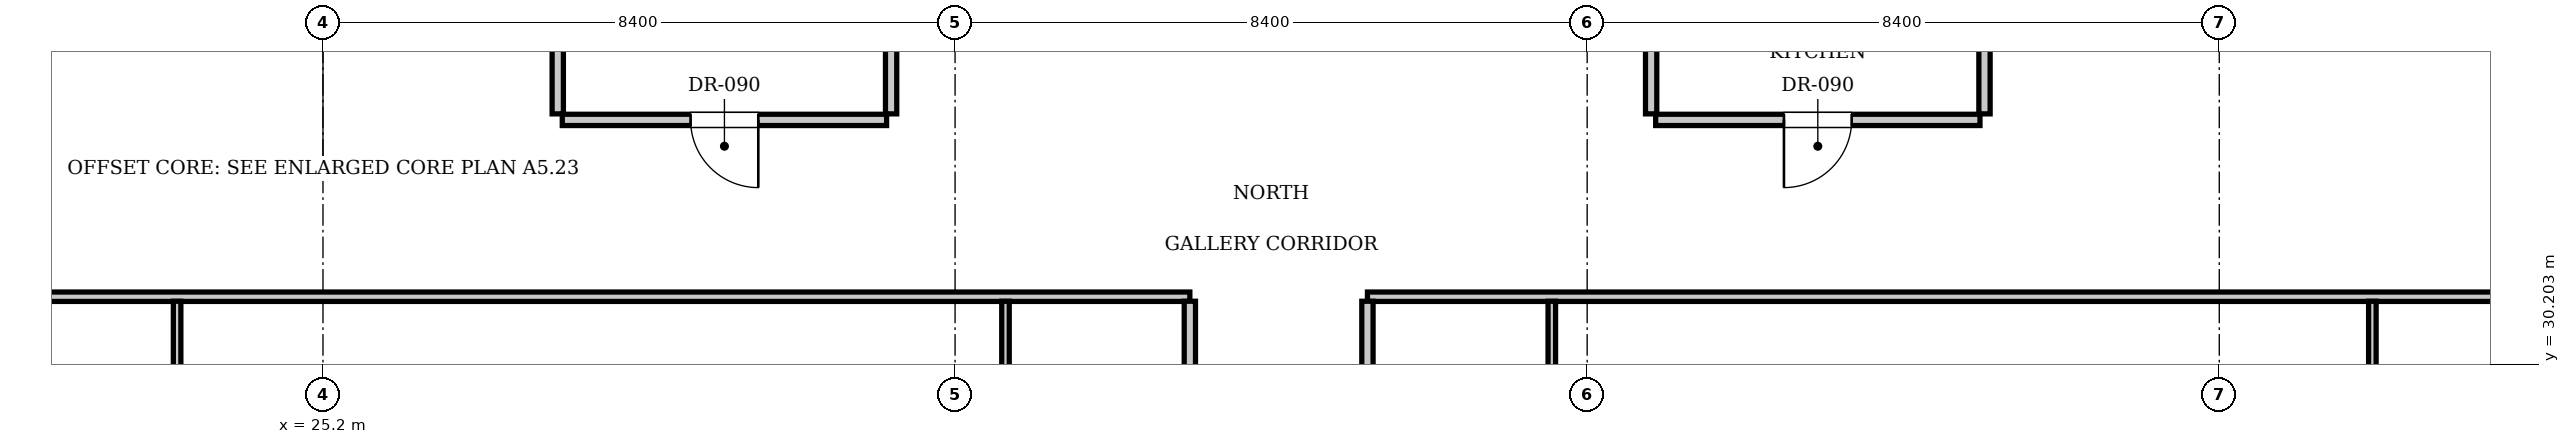
"""IFC4 building model, lengths in metres.
Left out: names, types, materials, properties, quantities, classifications, styles, units other than length and angle.
Written with IfcOpenShell. Run it as: python <this file> out.ifc"""

import sys

from ifc_helpers import new_model, si_unit, direction, frame, frame_2d, origin, place, context, subcontext, project, spatial, rectangle, extrude, element, fill, save


model = new_model("IFC4")
c1 = context("Model", 3, precision=1e-05, world=origin(), true_north=direction((0.0, 1.0)))
c2 = subcontext(c1, "Body", "Model", "MODEL_VIEW")
j1 = project(units=[si_unit("LENGTHUNIT", "METRE"), si_unit("PLANEANGLEUNIT", "RADIAN")], contexts=[c1])
p1 = place(None, origin())
s1 = spatial("IfcSite", under=j1, at=p1, CompositionType="ELEMENT")
p2 = place(p1, origin())
s2 = spatial("IfcBuilding", under=s1, at=p2, CompositionType="ELEMENT")
p3 = place(p2, frame((0.0, 0.0, 208.25)))
s3 = spatial("IfcBuildingStorey", under=s2, at=p3, CompositionType="ELEMENT", Elevation=208.25)
for number, where, z_axis, x_axis in (
    (1, (28.32, 33.53, 0.0), (0.0, 0.0, 1.0), (0.0, 1.0, 0.0)),
    (2, (32.75, 33.53, 0.0), (0.0, 0.0, 1.0), (0.0, 1.0, 0.0)),
):
    element("IfcWall", number, at=place(p3, frame(where, z_axis=z_axis, x_axis=x_axis)), inside=s3, PredefinedType="PARTITIONING", context=c2, shape_type="SweptSolid", body=[
        extrude(rectangle(XDim=2.59, YDim=0.15, at=frame_2d((1.295, 0.0))), origin(), (0.0, 0.0, 1.0), 3.61),
    ])
p4 = place(p3, frame((28.38, 33.45, 0.0), z_axis=(0.0, 0.0, 1.0), x_axis=(1.0, 0.0, 0.0)))
e3 = element("IfcWall", 3, at=p4, inside=s3, PredefinedType="PARTITIONING", context=c2, shape_type="SweptSolid", body=[
    extrude(rectangle(XDim=4.31, YDim=0.15, at=frame_2d((2.155, 0.0))), origin(), (0.0, 0.0, 1.0), 3.61),
])
p5 = place(p4, frame((1.705, 0.0, 0.0)))
e4 = element("IfcOpeningElement", 4, at=p5, cuts=e3, PredefinedType="OPENING", context=c2, shape_type="SweptSolid", body=[
    extrude(rectangle(XDim=0.9, YDim=2.1, at=frame_2d((0.45, 1.05))), frame((0.0, 0.085, 0.0), z_axis=(0.0, -1.0, 0.0), x_axis=(1.0, 0.0, 0.0)), (0.0, 0.0, 1.0), 0.17),
])
for number, where, z_axis, x_axis in (
    (5, (42.85, 33.53, 0.0), (0.0, 0.0, 1.0), (0.0, 1.0, 0.0)),
    (6, (47.28, 33.53, 0.0), (0.0, 0.0, 1.0), (0.0, 1.0, 0.0)),
):
    element("IfcWall", number, at=place(p3, frame(where, z_axis=z_axis, x_axis=x_axis)), inside=s3, PredefinedType="PARTITIONING", context=c2, shape_type="SweptSolid", body=[
        extrude(rectangle(XDim=2.59, YDim=0.15, at=frame_2d((1.295, 0.0))), origin(), (0.0, 0.0, 1.0), 3.61),
    ])
p6 = place(p3, frame((42.91, 33.45, 0.0), z_axis=(0.0, 0.0, 1.0), x_axis=(1.0, 0.0, 0.0)))
e7 = element("IfcWall", 7, at=p6, inside=s3, PredefinedType="PARTITIONING", context=c2, shape_type="SweptSolid", body=[
    extrude(rectangle(XDim=4.31, YDim=0.15, at=frame_2d((2.155, 0.0))), origin(), (0.0, 0.0, 1.0), 3.61),
])
p7 = place(p6, frame((1.705, 0.0, 0.0)))
e8 = element("IfcOpeningElement", 8, at=p7, cuts=e7, PredefinedType="OPENING", context=c2, shape_type="SweptSolid", body=[
    extrude(rectangle(XDim=0.9, YDim=2.1, at=frame_2d((0.45, 1.05))), frame((0.0, 0.085, 0.0), z_axis=(0.0, -1.0, 0.0), x_axis=(1.0, 0.0, 0.0)), (0.0, 0.0, 1.0), 0.17),
])
p8 = place(p3, frame((13.2, 31.1, 0.0), z_axis=(0.0, 0.0, 1.0), x_axis=(1.0, 0.0, 0.0)))
e9 = element("IfcWall", 9, at=p8, inside=s3, PredefinedType="PARTITIONING", context=c2, shape_type="SweptSolid", body=[
    extrude(rectangle(XDim=23.52, YDim=0.125, at=frame_2d((11.76, 0.0))), origin(), (0.0, 0.0, 1.0), 3.61),
])
p9 = place(p3, frame((39.08, 31.1, 0.0), z_axis=(0.0, 0.0, 1.0), x_axis=(1.0, 0.0, 0.0)))
e10 = element("IfcWall", 10, at=p9, inside=s3, PredefinedType="PARTITIONING", context=c2, shape_type="SweptSolid", body=[
    extrude(rectangle(XDim=23.32, YDim=0.125, at=frame_2d((11.66, 0.0))), origin(), (0.0, 0.0, 1.0), 3.61),
])
p10 = place(p3, frame((36.72, 29.15, 0.0), z_axis=(0.0, 0.0, 1.0), x_axis=(0.0, 1.0, 0.0)))
e11 = element("IfcWall", 11, at=p10, inside=s3, PredefinedType="PARTITIONING", context=c2, shape_type="SweptSolid", body=[
    extrude(rectangle(XDim=1.89, YDim=0.15, at=frame_2d((0.945, 0.0))), origin(), (0.0, 0.0, 1.0), 3.61),
])
p11 = place(p3, frame((34.27, 29.15, 0.0), z_axis=(0.0, 0.0, 1.0), x_axis=(0.0, 1.0, 0.0)))
e12 = element("IfcWall", 12, at=p11, inside=s3, PredefinedType="PARTITIONING", context=c2, shape_type="SweptSolid", body=[
    extrude(rectangle(XDim=1.89, YDim=0.1, at=frame_2d((0.945, 0.0))), origin(), (0.0, 0.0, 1.0), 3.61),
])
p12 = place(p3, frame((23.262, 26.76, 0.0), z_axis=(0.0, 0.0, 1.0), x_axis=(0.0, 1.0, 0.0)))
e13 = element("IfcWall", 13, at=p12, inside=s3, PredefinedType="PARTITIONING", context=c2, shape_type="SweptSolid", body=[
    extrude(rectangle(XDim=4.28, YDim=0.1, at=frame_2d((2.14, 0.0))), origin(), (0.0, 0.0, 1.0), 3.61),
])
p13 = place(p12, frame((1.69, 0.0, 0.0)))
e14 = element("IfcOpeningElement", 14, at=p13, cuts=e13, PredefinedType="OPENING", context=c2, shape_type="SweptSolid", body=[
    extrude(rectangle(XDim=0.9, YDim=2.1, at=frame_2d((0.45, 1.05))), frame((0.0, 0.06, 0.0), z_axis=(0.0, -1.0, 0.0), x_axis=(1.0, 0.0, 0.0)), (0.0, 0.0, 1.0), 0.12),
])
p14 = place(p3, frame((39.08, 29.15, 0.0), z_axis=(0.0, 0.0, 1.0), x_axis=(0.0, 1.0, 0.0)))
e15 = element("IfcWall", 15, at=p14, inside=s3, PredefinedType="PARTITIONING", context=c2, shape_type="SweptSolid", body=[
    extrude(rectangle(XDim=1.89, YDim=0.15, at=frame_2d((0.945, 0.0))), origin(), (0.0, 0.0, 1.0), 3.61),
])
p15 = place(p3, frame((41.53, 29.15, 0.0), z_axis=(0.0, 0.0, 1.0), x_axis=(0.0, 1.0, 0.0)))
e16 = element("IfcWall", 16, at=p15, inside=s3, PredefinedType="PARTITIONING", context=c2, shape_type="SweptSolid", body=[
    extrude(rectangle(XDim=1.89, YDim=0.1, at=frame_2d((0.945, 0.0))), origin(), (0.0, 0.0, 1.0), 3.61),
])
p16 = place(p3, frame((52.434, 26.76, 0.0), z_axis=(0.0, 0.0, 1.0), x_axis=(0.0, 1.0, 0.0)))
e17 = element("IfcWall", 17, at=p16, inside=s3, PredefinedType="PARTITIONING", context=c2, shape_type="SweptSolid", body=[
    extrude(rectangle(XDim=4.28, YDim=0.1, at=frame_2d((2.14, 0.0))), origin(), (0.0, 0.0, 1.0), 3.61),
])
p17 = place(p16, frame((1.69, 0.0, 0.0)))
e18 = element("IfcOpeningElement", 18, at=p17, cuts=e17, PredefinedType="OPENING", context=c2, shape_type="SweptSolid", body=[
    extrude(rectangle(XDim=0.9, YDim=2.1, at=frame_2d((0.45, 1.05))), frame((0.0, 0.06, 0.0), z_axis=(0.0, -1.0, 0.0), x_axis=(1.0, 0.0, 0.0)), (0.0, 0.0, 1.0), 0.12),
])
p18 = place(p5, frame((0.9, 0.0, 0.0), z_axis=(0.0, 0.0, 1.0), x_axis=(-1.0, 0.0, 0.0)))
e19 = element("IfcDoor", 19, at=p18, inside=s3, OperationType="SINGLE_SWING_LEFT", PredefinedType="DOOR", context=c2, shape_type="SweptSolid", body=[
    extrude(rectangle(XDim=0.9, YDim=2.1, at=frame_2d((0.45, 1.05))), frame((0.0, 0.025, 0.0), z_axis=(0.0, -1.0, 0.0), x_axis=(1.0, 0.0, 0.0)), (0.0, 0.0, 1.0), 0.05),
])
fill(e4, e19)
p19 = place(p7, frame((0.9, 0.0, 0.0), z_axis=(0.0, 0.0, 1.0), x_axis=(-1.0, 0.0, 0.0)))
e20 = element("IfcDoor", 20, at=p19, inside=s3, OperationType="SINGLE_SWING_RIGHT", PredefinedType="DOOR", context=c2, shape_type="SweptSolid", body=[
    extrude(rectangle(XDim=0.9, YDim=2.1, at=frame_2d((0.45, 1.05))), frame((0.0, 0.025, 0.0), z_axis=(0.0, -1.0, 0.0), x_axis=(1.0, 0.0, 0.0)), (0.0, 0.0, 1.0), 0.05),
])
fill(e8, e20)
save(model, sys.argv[1])
